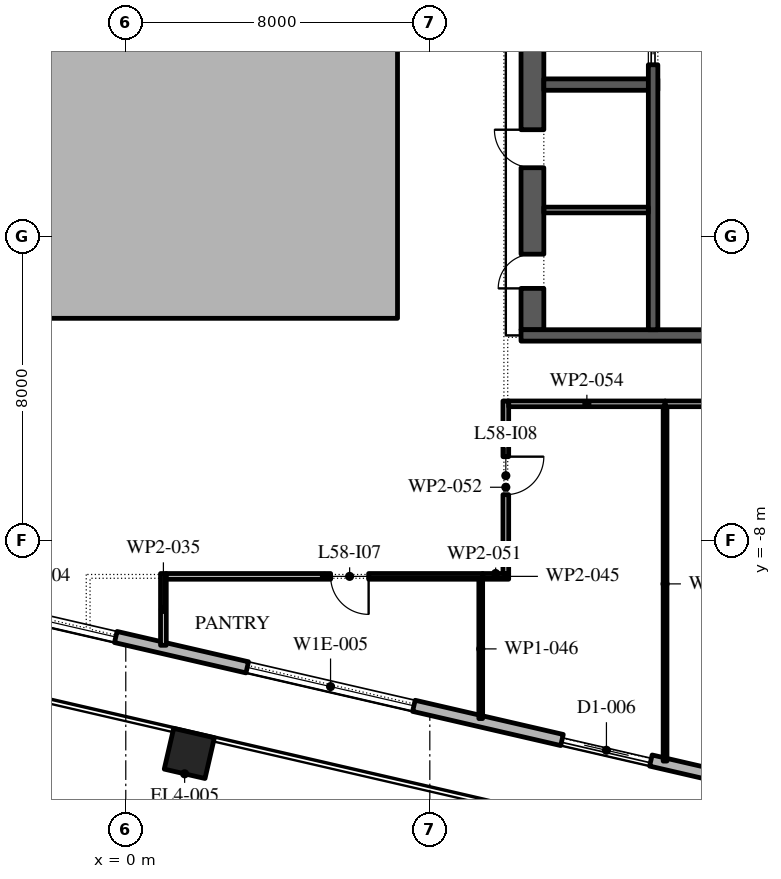
"""IFC4 building model, lengths in metres.
Left out: names, types, materials, properties, quantities, classifications, styles, units other than length and angle.
Written with IfcOpenShell. Run it as: python <this file> out.ifc"""

import sys

from ifc_helpers import new_model, si_unit, direction, frame, frame_2d, origin, origin_2d, place, context, subcontext, project, spatial, polyline, rectangle, outline, extrude, element, fill, save


model = new_model("IFC4")
c1 = context("Model", 3, precision=1e-05, world=origin(), true_north=direction((0.0, 1.0)))
c2 = subcontext(c1, "Body", "Model", "MODEL_VIEW")
j1 = project(units=[si_unit("LENGTHUNIT", "METRE"), si_unit("PLANEANGLEUNIT", "RADIAN")], contexts=[c1])
p1 = place(None, origin())
s1 = spatial("IfcSite", under=j1, at=p1, CompositionType="ELEMENT")
p2 = place(p1, origin())
s2 = spatial("IfcBuilding", under=s1, at=p2, CompositionType="ELEMENT")
p3 = place(p2, frame((0.0, 0.0, 268.2)))
s3 = spatial("IfcBuildingStorey", under=s2, at=p3, CompositionType="ELEMENT", Elevation=268.2)
p4 = place(p3, frame((1.672, -13.599, 0.0), z_axis=(0.0, 0.0, 1.0), x_axis=(0.974370064785, -0.224951054344, 0.0)))
e1 = element("IfcColumn", 1, at=p4, inside=s3, PredefinedType="COLUMN", context=c2, shape_type="SweptSolid", body=[
    extrude(rectangle(XDim=1.1, YDim=1.1, at=origin_2d()), origin(), (0.0, 0.0, 1.0), 4.2),
])
p5 = place(p3, origin())
e2 = element("IfcWall", 2, at=p5, inside=s3, PredefinedType="STANDARD", context=c2, shape_type="SweptSolid", body=[
    extrude(outline(polyline([(-7.15, -2.15), (7.15, -2.15), (7.15, 16.15), (-7.15, 16.15), (-7.15, -2.15)]), holes=[polyline([(-7.0, -2.0), (-7.0, 16.0), (7.0, 16.0), (7.0, -2.0), (-7.0, -2.0)])]), origin(), (0.0, 0.0, 1.0), 4.0),
])
p6 = place(p3, frame((-29.616, -3.758, 0.0), z_axis=(0.0, 0.0, 1.0), x_axis=(0.974370532314, -0.224949029246, 0.0)))
e3 = element("IfcWall", 3, at=p6, inside=s3, PredefinedType="STANDARD", context=c2, shape_type="SweptSolid", body=[
    extrude(rectangle(XDim=48.0, YDim=0.3, at=frame_2d((24.0, 0.0))), origin(), (0.0, 0.0, 1.0), 4.0),
])
p7 = place(p6, frame((1.625, 0.0, 0.45)))
e4 = element("IfcOpeningElement", 4, at=p7, cuts=e3, PredefinedType="OPENING", context=c2, shape_type="SweptSolid", body=[
    extrude(rectangle(XDim=4.5, YDim=3.05, at=frame_2d((2.25, 1.525))), frame((0.0, 0.16, 0.0), z_axis=(0.0, -1.0, 0.0), x_axis=(1.0, 0.0, 0.0)), (0.0, 0.0, 1.0), 0.32),
])
p8 = place(p6, frame((10.575, 0.0, 0.0)))
e5 = element("IfcOpeningElement", 5, at=p8, cuts=e3, PredefinedType="OPENING", context=c2, shape_type="SweptSolid", body=[
    extrude(rectangle(XDim=2.4, YDim=3.5, at=frame_2d((1.2, 1.75))), frame((0.0, 0.16, 0.0), z_axis=(0.0, -1.0, 0.0), x_axis=(1.0, 0.0, 0.0)), (0.0, 0.0, 1.0), 0.32),
])
p9 = place(p6, frame((17.575, 0.0, 0.45)))
e6 = element("IfcOpeningElement", 6, at=p9, cuts=e3, PredefinedType="OPENING", context=c2, shape_type="SweptSolid", body=[
    extrude(rectangle(XDim=4.5, YDim=3.0, at=frame_2d((2.25, 1.5))), frame((0.0, 0.16, 0.0), z_axis=(0.0, -1.0, 0.0), x_axis=(1.0, 0.0, 0.0)), (0.0, 0.0, 1.0), 0.32),
])
p10 = place(p6, frame((25.625, 0.0, 0.45)))
e7 = element("IfcOpeningElement", 7, at=p10, cuts=e3, PredefinedType="OPENING", context=c2, shape_type="SweptSolid", body=[
    extrude(rectangle(XDim=4.5, YDim=2.95, at=frame_2d((2.25, 1.475))), frame((0.0, 0.16, 0.0), z_axis=(0.0, -1.0, 0.0), x_axis=(1.0, 0.0, 0.0)), (0.0, 0.0, 1.0), 0.32),
])
p11 = place(p6, frame((33.675, 0.0, 0.45)))
e8 = element("IfcOpeningElement", 8, at=p11, cuts=e3, PredefinedType="OPENING", context=c2, shape_type="SweptSolid", body=[
    extrude(rectangle(XDim=4.5, YDim=2.825, at=frame_2d((2.25, 1.413))), frame((0.0, 0.16, 0.0), z_axis=(0.0, -1.0, 0.0), x_axis=(1.0, 0.0, 0.0)), (0.0, 0.0, 1.0), 0.32),
])
p12 = place(p6, frame((42.175, 0.0, 0.0)))
e9 = element("IfcOpeningElement", 9, at=p12, cuts=e3, PredefinedType="OPENING", context=c2, shape_type="SweptSolid", body=[
    extrude(rectangle(XDim=2.4, YDim=3.5, at=frame_2d((1.2, 1.75))), frame((0.0, 0.16, 0.0), z_axis=(0.0, -1.0, 0.0), x_axis=(1.0, 0.0, 0.0)), (0.0, 0.0, 1.0), 0.32),
])
p13 = place(p3, frame((10.7, -2.45, 0.0), z_axis=(0.0, 0.0, 1.0), x_axis=(0.0, 1.0, 0.0)))
e10 = element("IfcWall", 10, at=p13, inside=s3, PredefinedType="SHEAR", context=c2, shape_type="SweptSolid", body=[
    extrude(rectangle(XDim=27.9, YDim=0.6, at=frame_2d((13.95, 0.0))), origin(), (0.0, 0.0, 1.0), 4.0),
])
p14 = place(p13, frame((23.65, 0.0, 0.0)))
e11 = element("IfcOpeningElement", 11, at=p14, cuts=e10, PredefinedType="OPENING", context=c2, shape_type="SweptSolid", body=[
    extrude(rectangle(XDim=2.4, YDim=2.1, at=frame_2d((1.2, 1.05))), frame((0.0, 0.31, 0.0), z_axis=(0.0, -1.0, 0.0), x_axis=(1.0, 0.0, 0.0)), (0.0, 0.0, 1.0), 0.62),
])
p15 = place(p13, frame((1.087, 0.0, 0.0)))
e12 = element("IfcOpeningElement", 12, at=p15, cuts=e10, PredefinedType="OPENING", context=c2, shape_type="SweptSolid", body=[
    extrude(rectangle(XDim=0.9, YDim=2.1, at=frame_2d((0.45, 1.05))), frame((0.0, 0.31, 0.0), z_axis=(0.0, -1.0, 0.0), x_axis=(1.0, 0.0, 0.0)), (0.0, 0.0, 1.0), 0.62),
])
p16 = place(p13, frame((4.262, 0.0, 0.0)))
e13 = element("IfcOpeningElement", 13, at=p16, cuts=e10, PredefinedType="OPENING", context=c2, shape_type="SweptSolid", body=[
    extrude(rectangle(XDim=1.0, YDim=2.1, at=frame_2d((0.5, 1.05))), frame((0.0, 0.31, 0.0), z_axis=(0.0, -1.0, 0.0), x_axis=(1.0, 0.0, 0.0)), (0.0, 0.0, 1.0), 0.62),
])
p17 = place(p3, frame((10.4, -2.6, 0.0), z_axis=(0.0, 0.0, 1.0), x_axis=(1.0, 0.0, 0.0)))
e14 = element("IfcWall", 14, at=p17, inside=s3, PredefinedType="SHEAR", context=c2, shape_type="SweptSolid", body=[
    extrude(rectangle(XDim=11.2, YDim=0.3, at=frame_2d((5.6, 0.0))), origin(), (0.0, 0.0, 1.0), 4.0),
])
p18 = place(p3, frame((11.0, 4.0, 0.0), z_axis=(0.0, 0.0, 1.0), x_axis=(1.0, 0.0, 0.0)))
e15 = element("IfcWall", 15, at=p18, inside=s3, PredefinedType="SHEAR", context=c2, shape_type="SweptSolid", body=[
    extrude(rectangle(XDim=3.0, YDim=0.3, at=frame_2d((1.5, 0.0))), origin(), (0.0, 0.0, 1.0), 4.0),
])
p19 = place(p3, frame((13.875, -2.45, 0.0), z_axis=(0.0, 0.0, 1.0), x_axis=(0.0, 1.0, 0.0)))
e16 = element("IfcWall", 16, at=p19, inside=s3, PredefinedType="SHEAR", context=c2, shape_type="SweptSolid", body=[
    extrude(rectangle(XDim=21.3, YDim=0.25, at=frame_2d((10.65, 0.0))), origin(), (0.0, 0.0, 1.0), 4.0),
])
p20 = place(p19, frame((17.786, 0.0, 0.0)))
e17 = element("IfcOpeningElement", 17, at=p20, cuts=e16, PredefinedType="OPENING", context=c2, shape_type="SweptSolid", body=[
    extrude(rectangle(XDim=0.9, YDim=2.1, at=frame_2d((0.45, 1.05))), frame((0.0, 0.135, 0.0), z_axis=(0.0, -1.0, 0.0), x_axis=(1.0, 0.0, 0.0)), (0.0, 0.0, 1.0), 0.27),
])
p21 = place(p19, frame((6.971, 0.0, 0.0)))
e18 = element("IfcOpeningElement", 18, at=p21, cuts=e16, PredefinedType="OPENING", context=c2, shape_type="SweptSolid", body=[
    extrude(rectangle(XDim=1.1, YDim=2.1, at=frame_2d((0.55, 1.05))), frame((0.0, 0.135, 0.0), z_axis=(0.0, -1.0, 0.0), x_axis=(1.0, 0.0, 0.0)), (0.0, 0.0, 1.0), 0.27),
])
p22 = place(p19, frame((9.114, 0.0, 0.0)))
e19 = element("IfcOpeningElement", 19, at=p22, cuts=e16, PredefinedType="OPENING", context=c2, shape_type="SweptSolid", body=[
    extrude(rectangle(XDim=1.1, YDim=2.1, at=frame_2d((0.55, 1.05))), frame((0.0, 0.135, 0.0), z_axis=(0.0, -1.0, 0.0), x_axis=(1.0, 0.0, 0.0)), (0.0, 0.0, 1.0), 0.27),
])
p23 = place(p19, frame((11.257, 0.0, 0.0)))
e20 = element("IfcOpeningElement", 20, at=p23, cuts=e16, PredefinedType="OPENING", context=c2, shape_type="SweptSolid", body=[
    extrude(rectangle(XDim=1.1, YDim=2.1, at=frame_2d((0.55, 1.05))), frame((0.0, 0.135, 0.0), z_axis=(0.0, -1.0, 0.0), x_axis=(1.0, 0.0, 0.0)), (0.0, 0.0, 1.0), 0.27),
])
p24 = place(p19, frame((13.4, 0.0, 0.0)))
e21 = element("IfcOpeningElement", 21, at=p24, cuts=e16, PredefinedType="OPENING", context=c2, shape_type="SweptSolid", body=[
    extrude(rectangle(XDim=1.1, YDim=2.1, at=frame_2d((0.55, 1.05))), frame((0.0, 0.135, 0.0), z_axis=(0.0, -1.0, 0.0), x_axis=(1.0, 0.0, 0.0)), (0.0, 0.0, 1.0), 0.27),
])
p25 = place(p3, frame((11.0, 0.7, 0.0), z_axis=(0.0, 0.0, 1.0), x_axis=(1.0, 0.0, 0.0)))
e22 = element("IfcWall", 22, at=p25, inside=s3, PredefinedType="PARTITIONING", context=c2, shape_type="SweptSolid", body=[
    extrude(rectangle(XDim=2.75, YDim=0.15, at=frame_2d((1.375, 0.0))), origin(), (0.0, 0.0, 1.0), 4.0),
])
p26 = place(p3, frame((0.99, -8.865, 0.0), z_axis=(0.0, 0.0, 1.0), x_axis=(0.0, -1.0, 0.0)))
e23 = element("IfcWall", 23, at=p26, inside=s3, PredefinedType="PARTITIONING", context=c2, shape_type="SweptSolid", body=[
    extrude(rectangle(XDim=1.888, YDim=0.15, at=frame_2d((0.944, 0.0))), origin(), (0.0, 0.0, 1.0), 4.0),
])
p27 = place(p3, frame((9.39, -8.94, 0.0), z_axis=(0.0, 0.0, 1.0), x_axis=(-1.0, 0.0, 0.0)))
e24 = element("IfcWall", 24, at=p27, inside=s3, PredefinedType="PARTITIONING", context=c2, shape_type="SweptSolid", body=[
    extrude(rectangle(XDim=8.325, YDim=0.15, at=frame_2d((4.163, 0.0))), origin(), (0.0, 0.0, 1.0), 4.0),
])
p28 = place(p27, frame((3.0, 0.0, 0.0)))
e25 = element("IfcOpeningElement", 25, at=p28, cuts=e24, PredefinedType="OPENING", context=c2, shape_type="SweptSolid", body=[
    extrude(rectangle(XDim=1.0, YDim=2.1, at=frame_2d((0.5, 1.05))), frame((0.0, 0.085, 0.0), z_axis=(0.0, -1.0, 0.0), x_axis=(1.0, 0.0, 0.0)), (0.0, 0.0, 1.0), 0.17),
])
p29 = place(p3, frame((9.34, -9.015, 0.0), z_axis=(0.0, 0.0, 1.0), x_axis=(0.0, -1.0, 0.0)))
e26 = element("IfcWall", 26, at=p29, inside=s3, PredefinedType="PARTITIONING", context=c2, shape_type="SweptSolid", body=[
    extrude(rectangle(XDim=3.666, YDim=0.1, at=frame_2d((1.833, 0.0))), origin(), (0.0, 0.0, 1.0), 4.0),
])
p30 = place(p3, frame((10.075, -8.94, 0.0), z_axis=(0.0, 0.0, 1.0), x_axis=(-1.0, 0.0, 0.0)))
e27 = element("IfcWall", 27, at=p30, inside=s3, PredefinedType="PARTITIONING", context=c2, shape_type="SweptSolid", body=[
    extrude(rectangle(XDim=0.685, YDim=0.15, at=frame_2d((0.343, 0.0))), origin(), (0.0, 0.0, 1.0), 4.0),
])
p31 = place(p3, frame((10.0, -4.325, 0.0), z_axis=(0.0, 0.0, 1.0), x_axis=(0.0, -1.0, 0.0)))
e28 = element("IfcWall", 28, at=p31, inside=s3, PredefinedType="PARTITIONING", context=c2, shape_type="SweptSolid", body=[
    extrude(rectangle(XDim=4.54, YDim=0.15, at=frame_2d((2.27, 0.0))), origin(), (0.0, 0.0, 1.0), 4.0),
])
p32 = place(p31, frame((1.465, 0.0, 0.0)))
e29 = element("IfcOpeningElement", 29, at=p32, cuts=e28, PredefinedType="OPENING", context=c2, shape_type="SweptSolid", body=[
    extrude(rectangle(XDim=1.0, YDim=2.1, at=frame_2d((0.5, 1.05))), frame((0.0, 0.085, 0.0), z_axis=(0.0, -1.0, 0.0), x_axis=(1.0, 0.0, 0.0)), (0.0, 0.0, 1.0), 0.17),
])
p33 = place(p3, frame((14.19, -4.4, 0.0), z_axis=(0.0, 0.0, 1.0), x_axis=(-1.0, 0.0, 0.0)))
e30 = element("IfcWall", 30, at=p33, inside=s3, PredefinedType="PARTITIONING", context=c2, shape_type="SweptSolid", body=[
    extrude(rectangle(XDim=4.115, YDim=0.15, at=frame_2d((2.058, 0.0))), origin(), (0.0, 0.0, 1.0), 4.0),
])
p34 = place(p3, frame((14.19, -4.475, 0.0), z_axis=(0.0, 0.0, 1.0), x_axis=(0.0, -1.0, 0.0)))
e31 = element("IfcWall", 31, at=p34, inside=s3, PredefinedType="PARTITIONING", context=c2, shape_type="SweptSolid", body=[
    extrude(rectangle(XDim=9.325, YDim=0.1, at=frame_2d((4.663, 0.0))), origin(), (0.0, 0.0, 1.0), 4.0),
])
p35 = place(p3, frame((22.968, -4.4, 0.0), z_axis=(0.0, 0.0, 1.0), x_axis=(-1.0, 0.0, 0.0)))
e32 = element("IfcWall", 32, at=p35, inside=s3, PredefinedType="PARTITIONING", context=c2, shape_type="SweptSolid", body=[
    extrude(rectangle(XDim=8.778, YDim=0.15, at=frame_2d((4.389, 0.0))), origin(), (0.0, 0.0, 1.0), 4.0),
])
p36 = place(p35, frame((4.628, 0.0, 0.0)))
e33 = element("IfcOpeningElement", 33, at=p36, cuts=e32, PredefinedType="OPENING", context=c2, shape_type="SweptSolid", body=[
    extrude(rectangle(XDim=1.0, YDim=2.1, at=frame_2d((0.5, 1.05))), frame((0.0, 0.085, 0.0), z_axis=(0.0, -1.0, 0.0), x_axis=(1.0, 0.0, 0.0)), (0.0, 0.0, 1.0), 0.17),
])
p37 = place(p10, origin())
e34 = element("IfcWindow", 34, at=p37, inside=s3, PartitioningType="DOUBLE_PANEL_VERTICAL", PredefinedType="WINDOW", context=c2, shape_type="SweptSolid", body=[
    extrude(rectangle(XDim=4.5, YDim=2.95, at=frame_2d((2.25, 1.475))), frame((0.0, 0.03, 0.0), z_axis=(0.0, -1.0, 0.0), x_axis=(1.0, 0.0, 0.0)), (0.0, 0.0, 1.0), 0.06),
])
fill(e7, e34)
p38 = place(p11, origin())
e35 = element("IfcWindow", 35, at=p38, inside=s3, PartitioningType="DOUBLE_PANEL_VERTICAL", PredefinedType="WINDOW", context=c2, shape_type="SweptSolid", body=[
    extrude(rectangle(XDim=4.5, YDim=2.825, at=frame_2d((2.25, 1.413))), frame((0.0, 0.03, 0.0), z_axis=(0.0, -1.0, 0.0), x_axis=(1.0, 0.0, 0.0)), (0.0, 0.0, 1.0), 0.06),
])
fill(e8, e35)
p39 = place(p12, origin())
e36 = element("IfcDoor", 36, at=p39, inside=s3, OperationType="DOUBLE_DOOR_SLIDING", PredefinedType="DOOR", context=c2, shape_type="SweptSolid", body=[
    extrude(rectangle(XDim=2.4, YDim=3.5, at=frame_2d((1.2, 1.75))), frame((0.0, 0.025, 0.0), z_axis=(0.0, -1.0, 0.0), x_axis=(1.0, 0.0, 0.0)), (0.0, 0.0, 1.0), 0.05),
])
fill(e9, e36)
p40 = place(p21, origin())
e37 = element("IfcDoor", 37, at=p40, inside=s3, OperationType="SLIDING_TO_LEFT", PredefinedType="DOOR", context=c2, shape_type="SweptSolid", body=[
    extrude(rectangle(XDim=1.1, YDim=2.1, at=frame_2d((0.55, 1.05))), frame((0.0, 0.025, 0.0), z_axis=(0.0, -1.0, 0.0), x_axis=(1.0, 0.0, 0.0)), (0.0, 0.0, 1.0), 0.05),
])
fill(e18, e37)
p41 = place(p15, origin())
e38 = element("IfcDoor", 38, at=p41, inside=s3, OperationType="SINGLE_SWING_RIGHT", PredefinedType="DOOR", context=c2, shape_type="SweptSolid", body=[
    extrude(rectangle(XDim=0.9, YDim=2.1, at=frame_2d((0.45, 1.05))), frame((0.0, -0.25, 0.0), z_axis=(0.0, -1.0, 0.0), x_axis=(1.0, 0.0, 0.0)), (0.0, 0.0, 1.0), 0.05),
])
fill(e12, e38)
p42 = place(p16, origin())
e39 = element("IfcDoor", 39, at=p42, inside=s3, OperationType="SINGLE_SWING_LEFT", PredefinedType="DOOR", context=c2, shape_type="SweptSolid", body=[
    extrude(rectangle(XDim=1.0, YDim=2.1, at=frame_2d((0.5, 1.05))), frame((0.0, -0.25, 0.0), z_axis=(0.0, -1.0, 0.0), x_axis=(1.0, 0.0, 0.0)), (0.0, 0.0, 1.0), 0.05),
])
fill(e13, e39)
p43 = place(p28, origin())
e40 = element("IfcDoor", 40, at=p43, inside=s3, OperationType="SINGLE_SWING_RIGHT", PredefinedType="DOOR", context=c2, shape_type="SweptSolid", body=[
    extrude(rectangle(XDim=1.0, YDim=2.1, at=frame_2d((0.5, 1.05))), frame((0.0, 0.025, 0.0), z_axis=(0.0, -1.0, 0.0), x_axis=(1.0, 0.0, 0.0)), (0.0, 0.0, 1.0), 0.05),
])
fill(e25, e40)
p44 = place(p32, origin())
e41 = element("IfcDoor", 41, at=p44, inside=s3, OperationType="SINGLE_SWING_RIGHT", PredefinedType="DOOR", context=c2, shape_type="SweptSolid", body=[
    extrude(rectangle(XDim=1.0, YDim=2.1, at=frame_2d((0.5, 1.05))), frame((0.0, 0.025, 0.0), z_axis=(0.0, -1.0, 0.0), x_axis=(1.0, 0.0, 0.0)), (0.0, 0.0, 1.0), 0.05),
])
fill(e29, e41)
save(model, sys.argv[1])
